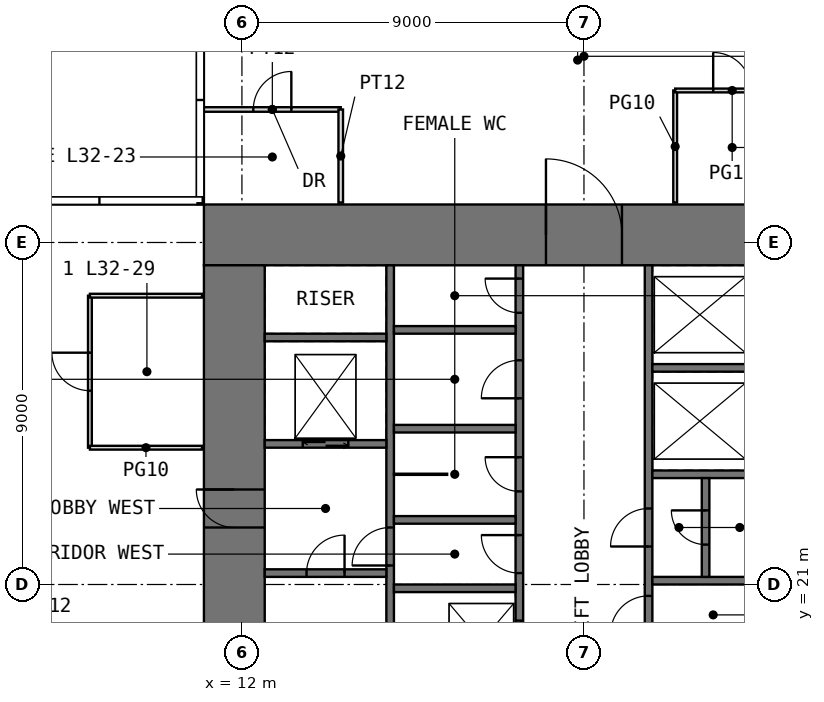
"""IFC4 building model, lengths in metres.
Left out: names, types, materials, properties, quantities, classifications, styles, units other than length and angle.
Written with IfcOpenShell. Run it as: python <this file> out.ifc"""

import sys

from ifc_helpers import new_model, si_unit, direction, frame, frame_2d, origin, place, context, subcontext, project, spatial, rectangle, extrude, element, fill, save


model = new_model("IFC4")
c1 = context("Model", 3, precision=1e-05, world=origin(), true_north=direction((0.0, 1.0)))
c2 = subcontext(c1, "Body", "Model", "MODEL_VIEW")
j1 = project(units=[si_unit("LENGTHUNIT", "METRE"), si_unit("PLANEANGLEUNIT", "RADIAN")], contexts=[c1])
p1 = place(None, origin())
s1 = spatial("IfcSite", under=j1, at=p1, CompositionType="ELEMENT")
p2 = place(p1, origin())
s2 = spatial("IfcBuilding", under=s1, at=p2, CompositionType="ELEMENT")
p3 = place(p2, frame((0.0, 0.0, 136.5)))
s3 = spatial("IfcBuildingStorey", under=s2, at=p3, CompositionType="ELEMENT", Elevation=136.5)
p4 = place(p3, frame((11.0, 30.2, -0.05), z_axis=(0.0, 0.0, 1.0), x_axis=(1.0, 0.0, 0.0)))
e1 = element("IfcWall", 1, at=p4, inside=s3, PredefinedType="SHEAR", context=c2, shape_type="SweptSolid", body=[
    extrude(rectangle(XDim=20.0, YDim=1.6, at=frame_2d((10.0, 0.0))), origin(), (0.0, 0.0, 1.0), 4.0),
])
p5 = place(p4, frame((9.0, 0.0, 0.05)))
e2 = element("IfcOpeningElement", 2, at=p5, cuts=e1, PredefinedType="OPENING", context=c2, shape_type="SweptSolid", body=[
    extrude(rectangle(XDim=2.0, YDim=2.2, at=frame_2d((1.0, 1.1))), frame((0.0, 0.81, 0.0), z_axis=(0.0, -1.0, 0.0), x_axis=(1.0, 0.0, 0.0)), (0.0, 0.0, 1.0), 1.62),
])
p6 = place(p3, frame((11.8, 12.6, -0.05), z_axis=(0.0, 0.0, 1.0), x_axis=(0.0, 1.0, 0.0)))
e3 = element("IfcWall", 3, at=p6, inside=s3, PredefinedType="SHEAR", context=c2, shape_type="SweptSolid", body=[
    extrude(rectangle(XDim=16.8, YDim=1.6, at=frame_2d((8.4, 0.0))), origin(), (0.0, 0.0, 1.0), 4.0),
])
p7 = place(p6, frame((9.9, 0.0, 0.05)))
e4 = element("IfcOpeningElement", 4, at=p7, cuts=e3, PredefinedType="OPENING", context=c2, shape_type="SweptSolid", body=[
    extrude(rectangle(XDim=1.0, YDim=2.2, at=frame_2d((0.5, 1.1))), frame((0.0, 0.81, 0.0), z_axis=(0.0, -1.0, 0.0), x_axis=(1.0, 0.0, 0.0)), (0.0, 0.0, 1.0), 1.62),
])
p8 = place(p3, frame((15.9, 12.6, -0.05), z_axis=(0.0, 0.0, 1.0), x_axis=(0.0, 1.0, 0.0)))
e5 = element("IfcWall", 5, at=p8, inside=s3, PredefinedType="SHEAR", context=c2, shape_type="SweptSolid", body=[
    extrude(rectangle(XDim=16.8, YDim=0.2, at=frame_2d((8.4, 0.0))), origin(), (0.0, 0.0, 1.0), 4.0),
])
p9 = place(p8, frame((8.9, 0.0, 0.05)))
e6 = element("IfcOpeningElement", 6, at=p9, cuts=e5, PredefinedType="OPENING", context=c2, shape_type="SweptSolid", body=[
    extrude(rectangle(XDim=1.0, YDim=2.2, at=frame_2d((0.5, 1.1))), frame((0.0, 0.11, 0.0), z_axis=(0.0, -1.0, 0.0), x_axis=(1.0, 0.0, 0.0)), (0.0, 0.0, 1.0), 0.22),
])
p10 = place(p3, frame((19.3, 12.6, -0.05), z_axis=(0.0, 0.0, 1.0), x_axis=(0.0, 1.0, 0.0)))
e7 = element("IfcWall", 7, at=p10, inside=s3, PredefinedType="SHEAR", context=c2, shape_type="SweptSolid", body=[
    extrude(rectangle(XDim=16.8, YDim=0.2, at=frame_2d((8.4, 0.0))), origin(), (0.0, 0.0, 1.0), 4.0),
])
p11 = place(p10, frame((8.7, 0.0, 0.05)))
e8 = element("IfcOpeningElement", 8, at=p11, cuts=e7, PredefinedType="OPENING", context=c2, shape_type="SweptSolid", body=[
    extrude(rectangle(XDim=1.0, YDim=2.2, at=frame_2d((0.5, 1.1))), frame((0.0, 0.11, 0.0), z_axis=(0.0, -1.0, 0.0), x_axis=(1.0, 0.0, 0.0)), (0.0, 0.0, 1.0), 0.22),
])
p12 = place(p10, frame((10.85, 0.0, 0.05)))
e9 = element("IfcOpeningElement", 9, at=p12, cuts=e7, PredefinedType="OPENING", context=c2, shape_type="SweptSolid", body=[
    extrude(rectangle(XDim=0.9, YDim=2.2, at=frame_2d((0.45, 1.1))), frame((0.0, 0.11, 0.0), z_axis=(0.0, -1.0, 0.0), x_axis=(1.0, 0.0, 0.0)), (0.0, 0.0, 1.0), 0.22),
])
p13 = place(p10, frame((13.3, 0.0, 0.05)))
e10 = element("IfcOpeningElement", 10, at=p13, cuts=e7, PredefinedType="OPENING", context=c2, shape_type="SweptSolid", body=[
    extrude(rectangle(XDim=1.0, YDim=2.2, at=frame_2d((0.5, 1.1))), frame((0.0, 0.11, 0.0), z_axis=(0.0, -1.0, 0.0), x_axis=(1.0, 0.0, 0.0)), (0.0, 0.0, 1.0), 0.22),
])
p14 = place(p10, frame((15.55, 0.0, 0.05)))
e11 = element("IfcOpeningElement", 11, at=p14, cuts=e7, PredefinedType="OPENING", context=c2, shape_type="SweptSolid", body=[
    extrude(rectangle(XDim=0.9, YDim=2.2, at=frame_2d((0.45, 1.1))), frame((0.0, 0.11, 0.0), z_axis=(0.0, -1.0, 0.0), x_axis=(1.0, 0.0, 0.0)), (0.0, 0.0, 1.0), 0.22),
])
p15 = place(p10, frame((0.75, 0.0, 0.05)))
e12 = element("IfcOpeningElement", 12, at=p15, cuts=e7, PredefinedType="OPENING", context=c2, shape_type="SweptSolid", body=[
    extrude(rectangle(XDim=1.1, YDim=2.2, at=frame_2d((0.55, 1.1))), frame((0.0, 0.11, 0.0), z_axis=(0.0, -1.0, 0.0), x_axis=(1.0, 0.0, 0.0)), (0.0, 0.0, 1.0), 0.22),
])
p16 = place(p10, frame((3.55, 0.0, 0.05)))
e13 = element("IfcOpeningElement", 13, at=p16, cuts=e7, PredefinedType="OPENING", context=c2, shape_type="SweptSolid", body=[
    extrude(rectangle(XDim=1.1, YDim=2.2, at=frame_2d((0.55, 1.1))), frame((0.0, 0.11, 0.0), z_axis=(0.0, -1.0, 0.0), x_axis=(1.0, 0.0, 0.0)), (0.0, 0.0, 1.0), 0.22),
])
p17 = place(p10, frame((6.35, 0.0, 0.05)))
e14 = element("IfcOpeningElement", 14, at=p17, cuts=e7, PredefinedType="OPENING", context=c2, shape_type="SweptSolid", body=[
    extrude(rectangle(XDim=1.1, YDim=2.2, at=frame_2d((0.55, 1.1))), frame((0.0, 0.11, 0.0), z_axis=(0.0, -1.0, 0.0), x_axis=(1.0, 0.0, 0.0)), (0.0, 0.0, 1.0), 0.22),
])
p18 = place(p3, frame((22.7, 12.6, -0.05), z_axis=(0.0, 0.0, 1.0), x_axis=(0.0, 1.0, 0.0)))
e15 = element("IfcWall", 15, at=p18, inside=s3, PredefinedType="SHEAR", context=c2, shape_type="SweptSolid", body=[
    extrude(rectangle(XDim=16.8, YDim=0.2, at=frame_2d((8.4, 0.0))), origin(), (0.0, 0.0, 1.0), 4.0),
])
p19 = place(p18, frame((0.45, 0.0, 0.05)))
e16 = element("IfcOpeningElement", 16, at=p19, cuts=e15, PredefinedType="OPENING", context=c2, shape_type="SweptSolid", body=[
    extrude(rectangle(XDim=0.9, YDim=2.2, at=frame_2d((0.45, 1.1))), frame((0.0, 0.11, 0.0), z_axis=(0.0, -1.0, 0.0), x_axis=(1.0, 0.0, 0.0)), (0.0, 0.0, 1.0), 0.22),
])
p20 = place(p18, frame((7.1, 0.0, 0.05)))
e17 = element("IfcOpeningElement", 17, at=p20, cuts=e15, PredefinedType="OPENING", context=c2, shape_type="SweptSolid", body=[
    extrude(rectangle(XDim=1.0, YDim=2.2, at=frame_2d((0.5, 1.1))), frame((0.0, 0.11, 0.0), z_axis=(0.0, -1.0, 0.0), x_axis=(1.0, 0.0, 0.0)), (0.0, 0.0, 1.0), 0.22),
])
p21 = place(p18, frame((1.95, 0.0, 0.05)))
e18 = element("IfcOpeningElement", 18, at=p21, cuts=e15, PredefinedType="OPENING", context=c2, shape_type="SweptSolid", body=[
    extrude(rectangle(XDim=0.9, YDim=2.2, at=frame_2d((0.45, 1.1))), frame((0.0, 0.11, 0.0), z_axis=(0.0, -1.0, 0.0), x_axis=(1.0, 0.0, 0.0)), (0.0, 0.0, 1.0), 0.22),
])
p22 = place(p18, frame((4.95, 0.0, 0.05)))
e19 = element("IfcOpeningElement", 19, at=p22, cuts=e15, PredefinedType="OPENING", context=c2, shape_type="SweptSolid", body=[
    extrude(rectangle(XDim=0.9, YDim=2.2, at=frame_2d((0.45, 1.1))), frame((0.0, 0.11, 0.0), z_axis=(0.0, -1.0, 0.0), x_axis=(1.0, 0.0, 0.0)), (0.0, 0.0, 1.0), 0.22),
])
p23 = place(p18, frame((9.4, 0.0, 0.05)))
e20 = element("IfcOpeningElement", 20, at=p23, cuts=e15, PredefinedType="OPENING", context=c2, shape_type="SweptSolid", body=[
    extrude(rectangle(XDim=1.0, YDim=2.2, at=frame_2d((0.5, 1.1))), frame((0.0, 0.11, 0.0), z_axis=(0.0, -1.0, 0.0), x_axis=(1.0, 0.0, 0.0)), (0.0, 0.0, 1.0), 0.22),
])
p24 = place(p3, frame((12.6, 21.3, -0.05), z_axis=(0.0, 0.0, 1.0), x_axis=(1.0, 0.0, 0.0)))
e21 = element("IfcWall", 21, at=p24, inside=s3, PredefinedType="SHEAR", context=c2, shape_type="SweptSolid", body=[
    extrude(rectangle(XDim=3.2, YDim=0.2, at=frame_2d((1.6, 0.0))), origin(), (0.0, 0.0, 1.0), 4.0),
])
p25 = place(p24, frame((1.1, 0.0, 0.05)))
e22 = element("IfcOpeningElement", 22, at=p25, cuts=e21, PredefinedType="OPENING", context=c2, shape_type="SweptSolid", body=[
    extrude(rectangle(XDim=1.0, YDim=2.2, at=frame_2d((0.5, 1.1))), frame((0.0, 0.11, 0.0), z_axis=(0.0, -1.0, 0.0), x_axis=(1.0, 0.0, 0.0)), (0.0, 0.0, 1.0), 0.22),
])
p26 = place(p3, frame((12.6, 24.7, -0.05), z_axis=(0.0, 0.0, 1.0), x_axis=(1.0, 0.0, 0.0)))
e23 = element("IfcWall", 23, at=p26, inside=s3, PredefinedType="SHEAR", context=c2, shape_type="SweptSolid", body=[
    extrude(rectangle(XDim=3.2, YDim=0.2, at=frame_2d((1.6, 0.0))), origin(), (0.0, 0.0, 1.0), 4.0),
])
p27 = place(p26, frame((1.0, 0.0, 0.05)))
e24 = element("IfcOpeningElement", 24, at=p27, cuts=e23, PredefinedType="OPENING", context=c2, shape_type="SweptSolid", body=[
    extrude(rectangle(XDim=1.2, YDim=2.2, at=frame_2d((0.6, 1.1))), frame((0.0, 0.11, 0.0), z_axis=(0.0, -1.0, 0.0), x_axis=(1.0, 0.0, 0.0)), (0.0, 0.0, 1.0), 0.22),
])
for number, where, z_axis, x_axis in (
    (25, (12.6, 27.5, -0.05), (0.0, 0.0, 1.0), (1.0, 0.0, 0.0)),
    (26, (16.0, 20.9, -0.05), (0.0, 0.0, 1.0), (1.0, 0.0, 0.0)),
    (27, (16.0, 22.7, -0.05), (0.0, 0.0, 1.0), (1.0, 0.0, 0.0)),
    (28, (16.0, 25.1, -0.05), (0.0, 0.0, 1.0), (1.0, 0.0, 0.0)),
    (29, (16.0, 27.7, -0.05), (0.0, 0.0, 1.0), (1.0, 0.0, 0.0)),
    (30, (22.8, 21.1, -0.05), (0.0, 0.0, 1.0), (1.0, 0.0, 0.0)),
    (31, (22.8, 23.9, -0.05), (0.0, 0.0, 1.0), (1.0, 0.0, 0.0)),
    (32, (22.8, 26.7, -0.05), (0.0, 0.0, 1.0), (1.0, 0.0, 0.0)),
):
    element("IfcWall", number, at=place(p3, frame(where, z_axis=z_axis, x_axis=x_axis)), inside=s3, PredefinedType="SHEAR", context=c2, shape_type="SweptSolid", body=[
        extrude(rectangle(XDim=3.2, YDim=0.2, at=frame_2d((1.6, 0.0))), origin(), (0.0, 0.0, 1.0), 4.0),
    ])
p28 = place(p3, frame((16.0, 23.9, 0.0), z_axis=(0.0, 0.0, 1.0), x_axis=(1.0, 0.0, 0.0)))
e33 = element("IfcWall", 33, at=p28, inside=s3, PredefinedType="PARTITIONING", context=c2, shape_type="SweptSolid", body=[
    extrude(rectangle(XDim=1.4, YDim=0.03, at=frame_2d((0.7, 0.0))), origin(), (0.0, 0.0, 1.0), 3.75),
])
p29 = place(p3, frame((24.2, 21.2, -0.05), z_axis=(0.0, 0.0, 1.0), x_axis=(0.0, 1.0, 0.0)))
e34 = element("IfcWall", 34, at=p29, inside=s3, PredefinedType="SHEAR", context=c2, shape_type="SweptSolid", body=[
    extrude(rectangle(XDim=2.6, YDim=0.2, at=frame_2d((1.3, 0.0))), origin(), (0.0, 0.0, 1.0), 4.0),
])
p30 = place(p29, frame((0.85, 0.0, 0.05)))
e35 = element("IfcOpeningElement", 35, at=p30, cuts=e34, PredefinedType="OPENING", context=c2, shape_type="SweptSolid", body=[
    extrude(rectangle(XDim=0.9, YDim=2.2, at=frame_2d((0.45, 1.1))), frame((0.0, 0.11, 0.0), z_axis=(0.0, -1.0, 0.0), x_axis=(1.0, 0.0, 0.0)), (0.0, 0.0, 1.0), 0.22),
])
p31 = place(p3, frame((8.0, 24.6, 0.0), z_axis=(0.0, 0.0, 1.0), x_axis=(0.0, 1.0, 0.0)))
e36 = element("IfcWall", 36, at=p31, inside=s3, PredefinedType="PARTITIONING", context=c2, shape_type="SweptSolid", body=[
    extrude(rectangle(XDim=4.0, YDim=0.1, at=frame_2d((2.0, 0.0))), origin(), (0.0, 0.0, 1.0), 3.75),
])
p32 = place(p31, frame((1.5, 0.0, 0.0)))
e37 = element("IfcOpeningElement", 37, at=p32, cuts=e36, PredefinedType="OPENING", context=c2, shape_type="SweptSolid", body=[
    extrude(rectangle(XDim=1.0, YDim=2.4, at=frame_2d((0.5, 1.2))), frame((0.0, 0.06, 0.0), z_axis=(0.0, -1.0, 0.0), x_axis=(1.0, 0.0, 0.0)), (0.0, 0.0, 1.0), 0.12),
])
for number, where, z_axis, x_axis in (
    (38, (8.0, 24.6, 0.0), (0.0, 0.0, 1.0), (1.0, 0.0, 0.0)),
    (39, (8.0, 28.6, 0.0), (0.0, 0.0, 1.0), (1.0, 0.0, 0.0)),
):
    element("IfcWall", number, at=place(p3, frame(where, z_axis=z_axis, x_axis=x_axis)), inside=s3, PredefinedType="PARTITIONING", context=c2, shape_type="SweptSolid", body=[
        extrude(rectangle(XDim=2.95, YDim=0.1, at=frame_2d((1.475, 0.0))), origin(), (0.0, 0.0, 1.0), 3.75),
    ])
p33 = place(p3, frame((11.0, 33.5, 0.0), z_axis=(0.0, 0.0, 1.0), x_axis=(1.0, 0.0, 0.0)))
e40 = element("IfcWall", 40, at=p33, inside=s3, PredefinedType="PARTITIONING", context=c2, shape_type="SweptSolid", body=[
    extrude(rectangle(XDim=3.6, YDim=0.12, at=frame_2d((1.8, 0.0))), origin(), (0.0, 0.0, 1.0), 3.75),
])
p34 = place(p33, frame((1.3, 0.0, 0.0)))
e41 = element("IfcOpeningElement", 41, at=p34, cuts=e40, PredefinedType="OPENING", context=c2, shape_type="SweptSolid", body=[
    extrude(rectangle(XDim=1.0, YDim=2.2, at=frame_2d((0.5, 1.1))), frame((0.0, 0.07, 0.0), z_axis=(0.0, -1.0, 0.0), x_axis=(1.0, 0.0, 0.0)), (0.0, 0.0, 1.0), 0.14),
])
p35 = place(p3, frame((14.6, 31.05, 0.0), z_axis=(0.0, 0.0, 1.0), x_axis=(0.0, 1.0, 0.0)))
e42 = element("IfcWall", 42, at=p35, inside=s3, PredefinedType="PARTITIONING", context=c2, shape_type="SweptSolid", body=[
    extrude(rectangle(XDim=2.45, YDim=0.12, at=frame_2d((1.225, 0.0))), origin(), (0.0, 0.0, 1.0), 3.75),
])
p36 = place(p3, frame((23.4, 31.05, 0.0), z_axis=(0.0, 0.0, 1.0), x_axis=(0.0, 1.0, 0.0)))
e43 = element("IfcWall", 43, at=p36, inside=s3, PredefinedType="PARTITIONING", context=c2, shape_type="SweptSolid", body=[
    extrude(rectangle(XDim=2.95, YDim=0.1, at=frame_2d((1.475, 0.0))), origin(), (0.0, 0.0, 1.0), 3.75),
])
p37 = place(p3, frame((23.4, 34.0, 0.0), z_axis=(0.0, 0.0, 1.0), x_axis=(1.0, 0.0, 0.0)))
e44 = element("IfcWall", 44, at=p37, inside=s3, PredefinedType="PARTITIONING", context=c2, shape_type="SweptSolid", body=[
    extrude(rectangle(XDim=3.0, YDim=0.1, at=frame_2d((1.5, 0.0))), origin(), (0.0, 0.0, 1.0), 3.75),
])
p38 = place(p37, frame((1.0, 0.0, 0.0)))
e45 = element("IfcOpeningElement", 45, at=p38, cuts=e44, PredefinedType="OPENING", context=c2, shape_type="SweptSolid", body=[
    extrude(rectangle(XDim=1.0, YDim=2.4, at=frame_2d((0.5, 1.2))), frame((0.0, 0.06, 0.0), z_axis=(0.0, -1.0, 0.0), x_axis=(1.0, 0.0, 0.0)), (0.0, 0.0, 1.0), 0.12),
])
p39 = place(p5, origin())
e46 = element("IfcDoor", 46, at=p39, inside=s3, OperationType="DOUBLE_DOOR_SINGLE_SWING", PredefinedType="DOOR", context=c2, shape_type="SweptSolid", body=[
    extrude(rectangle(XDim=2.0, YDim=2.2, at=frame_2d((1.0, 1.1))), frame((0.0, 0.025, 0.0), z_axis=(0.0, -1.0, 0.0), x_axis=(1.0, 0.0, 0.0)), (0.0, 0.0, 1.0), 0.05),
])
fill(e2, e46)
p40 = place(p7, origin())
e47 = element("IfcDoor", 47, at=p40, inside=s3, OperationType="SINGLE_SWING_RIGHT", PredefinedType="DOOR", context=c2, shape_type="SweptSolid", body=[
    extrude(rectangle(XDim=1.0, YDim=2.2, at=frame_2d((0.5, 1.1))), frame((0.0, 0.025, 0.0), z_axis=(0.0, -1.0, 0.0), x_axis=(1.0, 0.0, 0.0)), (0.0, 0.0, 1.0), 0.05),
])
fill(e4, e47)
p41 = place(p25, origin())
e48 = element("IfcDoor", 48, at=p41, inside=s3, OperationType="SINGLE_SWING_RIGHT", PredefinedType="DOOR", context=c2, shape_type="SweptSolid", body=[
    extrude(rectangle(XDim=1.0, YDim=2.2, at=frame_2d((0.5, 1.1))), frame((0.0, 0.025, 0.0), z_axis=(0.0, -1.0, 0.0), x_axis=(1.0, 0.0, 0.0)), (0.0, 0.0, 1.0), 0.05),
])
fill(e22, e48)
p42 = place(p9, origin())
e49 = element("IfcDoor", 49, at=p42, inside=s3, OperationType="SINGLE_SWING_LEFT", PredefinedType="DOOR", context=c2, shape_type="SweptSolid", body=[
    extrude(rectangle(XDim=1.0, YDim=2.2, at=frame_2d((0.5, 1.1))), frame((0.0, 0.025, 0.0), z_axis=(0.0, -1.0, 0.0), x_axis=(1.0, 0.0, 0.0)), (0.0, 0.0, 1.0), 0.05),
])
fill(e6, e49)
p43 = place(p11, origin())
e50 = element("IfcDoor", 50, at=p43, inside=s3, OperationType="SINGLE_SWING_RIGHT", PredefinedType="DOOR", context=c2, shape_type="SweptSolid", body=[
    extrude(rectangle(XDim=1.0, YDim=2.2, at=frame_2d((0.5, 1.1))), frame((0.0, 0.025, 0.0), z_axis=(0.0, -1.0, 0.0), x_axis=(1.0, 0.0, 0.0)), (0.0, 0.0, 1.0), 0.05),
])
fill(e8, e50)
p44 = place(p20, origin())
e51 = element("IfcDoor", 51, at=p44, inside=s3, OperationType="SINGLE_SWING_LEFT", PredefinedType="DOOR", context=c2, shape_type="SweptSolid", body=[
    extrude(rectangle(XDim=1.0, YDim=2.2, at=frame_2d((0.5, 1.1))), frame((0.0, 0.025, 0.0), z_axis=(0.0, -1.0, 0.0), x_axis=(1.0, 0.0, 0.0)), (0.0, 0.0, 1.0), 0.05),
])
fill(e17, e51)
p45 = place(p12, origin())
e52 = element("IfcDoor", 52, at=p45, inside=s3, OperationType="SINGLE_SWING_RIGHT", PredefinedType="DOOR", context=c2, shape_type="SweptSolid", body=[
    extrude(rectangle(XDim=0.9, YDim=2.2, at=frame_2d((0.45, 1.1))), frame((0.0, 0.025, 0.0), z_axis=(0.0, -1.0, 0.0), x_axis=(1.0, 0.0, 0.0)), (0.0, 0.0, 1.0), 0.05),
])
fill(e9, e52)
p46 = place(p13, origin())
e53 = element("IfcDoor", 53, at=p46, inside=s3, OperationType="SINGLE_SWING_LEFT", PredefinedType="DOOR", context=c2, shape_type="SweptSolid", body=[
    extrude(rectangle(XDim=1.0, YDim=2.2, at=frame_2d((0.5, 1.1))), frame((0.0, 0.025, 0.0), z_axis=(0.0, -1.0, 0.0), x_axis=(1.0, 0.0, 0.0)), (0.0, 0.0, 1.0), 0.05),
])
fill(e10, e53)
p47 = place(p14, origin())
e54 = element("IfcDoor", 54, at=p47, inside=s3, OperationType="SINGLE_SWING_RIGHT", PredefinedType="DOOR", context=c2, shape_type="SweptSolid", body=[
    extrude(rectangle(XDim=0.9, YDim=2.2, at=frame_2d((0.45, 1.1))), frame((0.0, 0.025, 0.0), z_axis=(0.0, -1.0, 0.0), x_axis=(1.0, 0.0, 0.0)), (0.0, 0.0, 1.0), 0.05),
])
fill(e11, e54)
p48 = place(p23, origin())
e55 = element("IfcDoor", 55, at=p48, inside=s3, OperationType="SINGLE_SWING_LEFT", PredefinedType="DOOR", context=c2, shape_type="SweptSolid", body=[
    extrude(rectangle(XDim=1.0, YDim=2.2, at=frame_2d((0.5, 1.1))), frame((0.0, 0.025, 0.0), z_axis=(0.0, -1.0, 0.0), x_axis=(1.0, 0.0, 0.0)), (0.0, 0.0, 1.0), 0.05),
])
fill(e20, e55)
p49 = place(p30, origin())
e56 = element("IfcDoor", 56, at=p49, inside=s3, OperationType="SINGLE_SWING_RIGHT", PredefinedType="DOOR", context=c2, shape_type="SweptSolid", body=[
    extrude(rectangle(XDim=0.9, YDim=2.2, at=frame_2d((0.45, 1.1))), frame((0.0, 0.025, 0.0), z_axis=(0.0, -1.0, 0.0), x_axis=(1.0, 0.0, 0.0)), (0.0, 0.0, 1.0), 0.05),
])
fill(e35, e56)
p50 = place(p34, origin())
e57 = element("IfcDoor", 57, at=p50, inside=s3, OperationType="SINGLE_SWING_RIGHT", PredefinedType="DOOR", context=c2, shape_type="SweptSolid", body=[
    extrude(rectangle(XDim=1.0, YDim=2.2, at=frame_2d((0.5, 1.1))), frame((0.0, 0.025, 0.0), z_axis=(0.0, -1.0, 0.0), x_axis=(1.0, 0.0, 0.0)), (0.0, 0.0, 1.0), 0.05),
])
fill(e41, e57)
p51 = place(p38, origin())
e58 = element("IfcDoor", 58, at=p51, inside=s3, OperationType="SINGLE_SWING_LEFT", PredefinedType="DOOR", context=c2, shape_type="SweptSolid", body=[
    extrude(rectangle(XDim=1.0, YDim=2.4, at=frame_2d((0.5, 1.2))), frame((0.0, 0.025, 0.0), z_axis=(0.0, -1.0, 0.0), x_axis=(1.0, 0.0, 0.0)), (0.0, 0.0, 1.0), 0.05),
])
fill(e45, e58)
p52 = place(p32, origin())
e59 = element("IfcDoor", 59, at=p52, inside=s3, OperationType="SINGLE_SWING_RIGHT", PredefinedType="DOOR", context=c2, shape_type="SweptSolid", body=[
    extrude(rectangle(XDim=1.0, YDim=2.4, at=frame_2d((0.5, 1.2))), frame((0.0, 0.025, 0.0), z_axis=(0.0, -1.0, 0.0), x_axis=(1.0, 0.0, 0.0)), (0.0, 0.0, 1.0), 0.05),
])
fill(e37, e59)
p53 = place(p17, origin())
e60 = element("IfcDoor", 60, at=p53, inside=s3, OperationType="DOUBLE_DOOR_SLIDING", PredefinedType="DOOR", context=c2, shape_type="SweptSolid", body=[
    extrude(rectangle(XDim=1.1, YDim=2.2, at=frame_2d((0.55, 1.1))), frame((0.0, 0.025, 0.0), z_axis=(0.0, -1.0, 0.0), x_axis=(1.0, 0.0, 0.0)), (0.0, 0.0, 1.0), 0.05),
])
fill(e14, e60)
p54 = place(p27, origin())
e61 = element("IfcDoor", 61, at=p54, inside=s3, OperationType="DOUBLE_DOOR_SLIDING", PredefinedType="DOOR", context=c2, shape_type="SweptSolid", body=[
    extrude(rectangle(XDim=1.2, YDim=2.2, at=frame_2d((0.6, 1.1))), frame((0.0, 0.025, 0.0), z_axis=(0.0, -1.0, 0.0), x_axis=(1.0, 0.0, 0.0)), (0.0, 0.0, 1.0), 0.05),
])
fill(e24, e61)
save(model, sys.argv[1])
